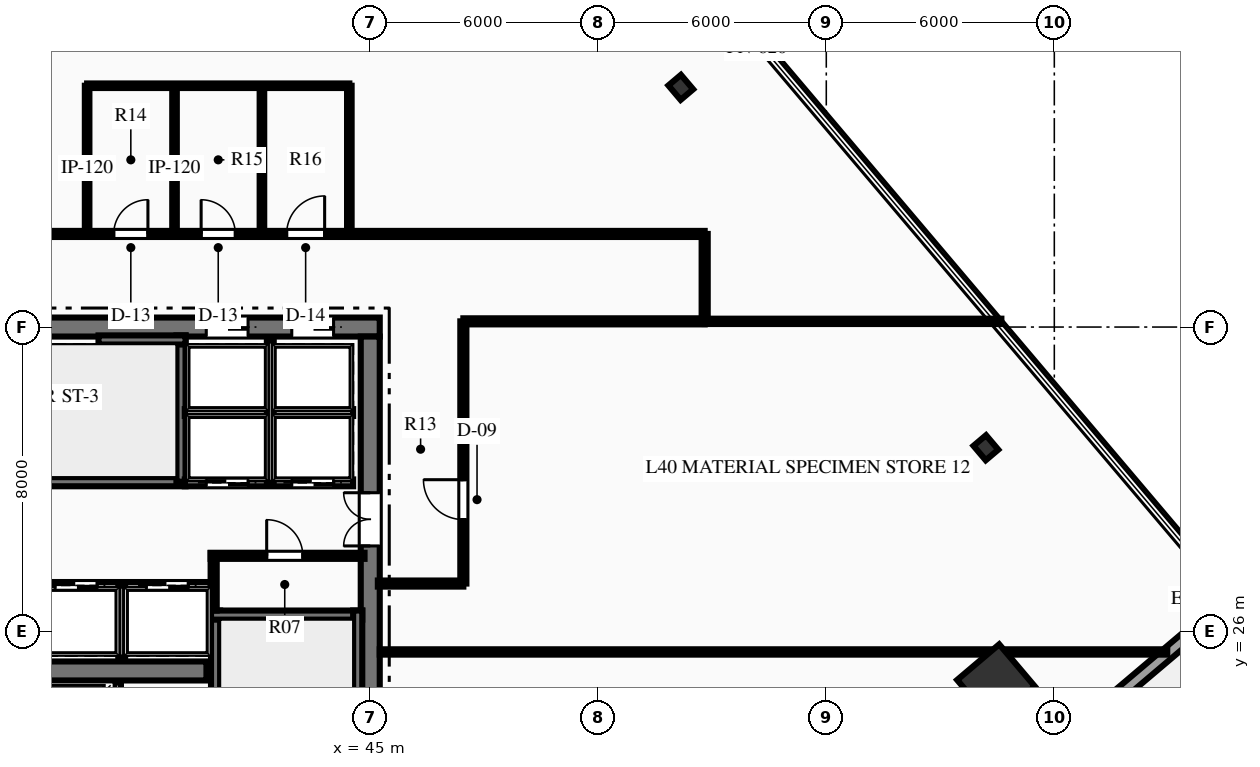
"""IFC4 building model, lengths in metres.
Left out: names, types, materials, properties, quantities, classifications, styles, units other than length and angle.
Written with IfcOpenShell. Run it as: python <this file> out.ifc"""

import sys

from ifc_helpers import new_model, si_unit, direction, frame, frame_2d, origin, origin_2d, place, context, subcontext, project, spatial, rectangle, hollow_rectangle, i_section, extrude, element, fill, save


model = new_model("IFC4")
c1 = context("Model", 3, precision=1e-05, world=origin(), true_north=direction((0.0, 1.0)))
c2 = subcontext(c1, "Body", "Model", "MODEL_VIEW")
j1 = project(units=[si_unit("LENGTHUNIT", "METRE"), si_unit("PLANEANGLEUNIT", "RADIAN")], contexts=[c1])
p1 = place(None, origin())
s1 = spatial("IfcSite", under=j1, at=p1, CompositionType="ELEMENT")
p2 = place(p1, origin())
s2 = spatial("IfcBuilding", under=s1, at=p2, CompositionType="ELEMENT")
p3 = place(p2, frame((0.0, 0.0, 163.2)))
s3 = spatial("IfcBuildingStorey", under=s2, at=p3, CompositionType="ELEMENT", Elevation=163.2)
p4 = place(p3, frame((26.75, 34.0, 0.0), z_axis=(0.0, 0.0, 1.0), x_axis=(1.0, 0.0, 0.0)))
e1 = element("IfcWall", 1, at=p4, inside=s3, PredefinedType="SHEAR", context=c2, shape_type="SweptSolid", body=[
    extrude(rectangle(XDim=18.5, YDim=0.5, at=frame_2d((9.25, 0.0))), origin(), (0.0, 0.0, 1.0), 3.75),
])
p5 = place(p4, frame((13.935, 0.0, 0.0)))
e2 = element("IfcOpeningElement", 2, at=p5, cuts=e1, PredefinedType="OPENING", context=c2, shape_type="SweptSolid", body=[
    extrude(rectangle(XDim=1.1, YDim=2.15, at=frame_2d((0.55, 1.075))), frame((0.0, 0.26, 0.0), z_axis=(0.0, -1.0, 0.0), x_axis=(1.0, 0.0, 0.0)), (0.0, 0.0, 1.0), 0.52),
])
p6 = place(p4, frame((16.185, 0.0, 0.0)))
e3 = element("IfcOpeningElement", 3, at=p6, cuts=e1, PredefinedType="OPENING", context=c2, shape_type="SweptSolid", body=[
    extrude(rectangle(XDim=1.1, YDim=2.15, at=frame_2d((0.55, 1.075))), frame((0.0, 0.26, 0.0), z_axis=(0.0, -1.0, 0.0), x_axis=(1.0, 0.0, 0.0)), (0.0, 0.0, 1.0), 0.52),
])
p7 = place(p3, frame((45.0, 18.25, 0.0), z_axis=(0.0, 0.0, 1.0), x_axis=(0.0, 1.0, 0.0)))
e4 = element("IfcWall", 4, at=p7, inside=s3, PredefinedType="SHEAR", context=c2, shape_type="SweptSolid", body=[
    extrude(rectangle(XDim=15.5, YDim=0.5, at=frame_2d((7.75, 0.0))), origin(), (0.0, 0.0, 1.0), 3.75),
])
p8 = place(p7, frame((9.99, 0.0, 0.0)))
e5 = element("IfcOpeningElement", 5, at=p8, cuts=e4, PredefinedType="OPENING", context=c2, shape_type="SweptSolid", body=[
    extrude(rectangle(XDim=1.4, YDim=2.2, at=frame_2d((0.7, 1.1))), frame((0.0, 0.26, 0.0), z_axis=(0.0, -1.0, 0.0), x_axis=(1.0, 0.0, 0.0)), (0.0, 0.0, 1.0), 0.52),
])
p9 = place(p3, frame((31.31, 24.95, 0.0), z_axis=(0.0, 0.0, 1.0), x_axis=(1.0, 0.0, 0.0)))
e6 = element("IfcWall", 6, at=p9, inside=s3, PredefinedType="SHEAR", context=c2, shape_type="SweptSolid", body=[
    extrude(rectangle(XDim=9.38, YDim=0.5, at=frame_2d((4.69, 0.0))), origin(), (0.0, 0.0, 1.0), 3.75),
])
p10 = place(p3, frame((40.93, 18.28, 0.0), z_axis=(0.0, 0.0, 1.0), x_axis=(0.0, 1.0, 0.0)))
e7 = element("IfcWall", 7, at=p10, inside=s3, PredefinedType="SHEAR", context=c2, shape_type="SweptSolid", body=[
    extrude(rectangle(XDim=8.26, YDim=0.24, at=frame_2d((4.13, 0.0))), origin(), (0.0, 0.0, 1.0), 3.75),
])
p11 = place(p10, frame((0.365, 0.0, 0.0)))
e8 = element("IfcOpeningElement", 8, at=p11, cuts=e7, PredefinedType="OPENING", context=c2, shape_type="SweptSolid", body=[
    extrude(rectangle(XDim=1.05, YDim=2.15, at=frame_2d((0.525, 1.075))), frame((0.0, 0.13, 0.0), z_axis=(0.0, -1.0, 0.0), x_axis=(1.0, 0.0, 0.0)), (0.0, 0.0, 1.0), 0.26),
])
p12 = place(p3, frame((40.81, 26.42, 0.0), z_axis=(0.0, 0.0, 1.0), x_axis=(1.0, 0.0, 0.0)))
e9 = element("IfcWall", 9, at=p12, inside=s3, PredefinedType="SHEAR", context=c2, shape_type="SweptSolid", body=[
    extrude(rectangle(XDim=3.98, YDim=0.24, at=frame_2d((1.99, 0.0))), origin(), (0.0, 0.0, 1.0), 3.75),
])
p13 = place(p3, frame((44.67, 18.28, 0.0), z_axis=(0.0, 0.0, 1.0), x_axis=(0.0, 1.0, 0.0)))
e10 = element("IfcWall", 10, at=p13, inside=s3, PredefinedType="SHEAR", context=c2, shape_type="SweptSolid", body=[
    extrude(rectangle(XDim=8.26, YDim=0.24, at=frame_2d((4.13, 0.0))), origin(), (0.0, 0.0, 1.0), 3.75),
])
p14 = place(p3, frame((31.76, 29.93, 0.0), z_axis=(0.0, 0.0, 1.0), x_axis=(1.0, 0.0, 0.0)))
e11 = element("IfcWall", 11, at=p14, inside=s3, PredefinedType="SHEAR", context=c2, shape_type="SweptSolid", body=[
    extrude(rectangle(XDim=8.38, YDim=0.24, at=frame_2d((4.19, 0.0))), origin(), (0.0, 0.0, 1.0), 3.75),
])
p15 = place(p14, frame((0.565, 0.0, 0.0)))
e12 = element("IfcOpeningElement", 12, at=p15, cuts=e11, PredefinedType="OPENING", context=c2, shape_type="SweptSolid", body=[
    extrude(rectangle(XDim=1.05, YDim=2.15, at=frame_2d((0.525, 1.075))), frame((0.0, 0.13, 0.0), z_axis=(0.0, -1.0, 0.0), x_axis=(1.0, 0.0, 0.0)), (0.0, 0.0, 1.0), 0.26),
])
p16 = place(p3, frame((40.02, 29.93, 0.0), z_axis=(0.0, 0.0, 1.0), x_axis=(0.0, 1.0, 0.0)))
e13 = element("IfcWall", 13, at=p16, inside=s3, PredefinedType="SHEAR", context=c2, shape_type="SweptSolid", body=[
    extrude(rectangle(XDim=3.85, YDim=0.24, at=frame_2d((1.925, 0.0))), origin(), (0.0, 0.0, 1.0), 3.75),
])
p17 = place(p3, frame((37.85, 33.66, 0.0), z_axis=(0.0, 0.0, 1.0), x_axis=(1.0, 0.0, 0.0)))
e14 = element("IfcWall", 14, at=p17, inside=s3, PredefinedType="SHEAR", context=c2, shape_type="SweptSolid", body=[
    extrude(rectangle(XDim=2.29, YDim=0.24, at=frame_2d((1.145, 0.0))), origin(), (0.0, 0.0, 1.0), 3.75),
])
p18 = place(p3, frame((61.465, 24.629, 0.0), z_axis=(0.0, 0.0, 1.0), x_axis=(0.763232469783, 0.646123979643, 0.0)))
e15 = element("IfcColumn", 15, at=p18, inside=s3, PredefinedType="COLUMN", context=c2, shape_type="SweptSolid", body=[
    extrude(hollow_rectangle(XDim=1.45, YDim=1.45, WallThickness=0.07, at=origin_2d()), origin(), (0.0, 0.0, 1.0), 3.75),
])
for number, where, z_axis, x_axis in (
    (16, (61.199, 30.824, 0.0), (0.0, 0.0, 1.0), (0.763, 0.646, 0.0)),
    (17, (53.171, 40.307, 0.0), (0.0, 0.0, 1.0), (0.763, 0.646, 0.0)),
):
    element("IfcColumn", number, at=place(p3, frame(where, z_axis=z_axis, x_axis=x_axis)), inside=s3, PredefinedType="COLUMN", context=c2, shape_type="SweptSolid", body=[
        extrude(i_section(OverallWidth=0.432, OverallDepth=0.498, WebThickness=0.056, FlangeThickness=0.089, at=origin_2d()), origin(), (0.0, 0.0, 1.0), 3.75),
    ])
p19 = place(p3, frame((67.776, 26.925, 0.0), z_axis=(0.0, 0.0, 1.0), x_axis=(-0.763214932113, -0.646144695405, 0.0)))
e18 = element("IfcWall", 18, at=p19, inside=s3, PredefinedType="STANDARD", context=c2, shape_type="SweptSolid", body=[
    extrude(rectangle(XDim=4.0, YDim=0.32, at=frame_2d((2.0, 0.0))), origin(), (0.0, 0.0, 1.0), 3.46),
])
p20 = place(p3, frame((38.35, 22.05, 0.0), z_axis=(0.0, 0.0, 1.0), x_axis=(0.0, 1.0, 0.0)))
e19 = element("IfcWall", 19, at=p20, inside=s3, PredefinedType="PARTITIONING", context=c2, shape_type="SweptSolid", body=[
    extrude(rectangle(XDim=2.6, YDim=0.18, at=frame_2d((1.3, 0.0))), origin(), (0.0, 0.0, 1.0), 3.46),
])
p21 = place(p3, frame((40.8, 27.98, 0.0), z_axis=(0.0, 0.0, 1.0), x_axis=(1.0, 0.0, 0.0)))
e20 = element("IfcWall", 20, at=p21, inside=s3, PredefinedType="PARTITIONING", context=c2, shape_type="SweptSolid", body=[
    extrude(rectangle(XDim=4.05, YDim=0.16, at=frame_2d((2.025, 0.0))), origin(), (0.0, 0.0, 1.0), 3.46),
])
p22 = place(p21, frame((1.475, 0.0, 0.0)))
e21 = element("IfcOpeningElement", 21, at=p22, cuts=e20, PredefinedType="OPENING", context=c2, shape_type="SweptSolid", body=[
    extrude(rectangle(XDim=0.95, YDim=2.15, at=frame_2d((0.475, 1.075))), frame((0.0, 0.09, 0.0), z_axis=(0.0, -1.0, 0.0), x_axis=(1.0, 0.0, 0.0)), (0.0, 0.0, 1.0), 0.18),
])
p23 = place(p3, frame((40.88, 26.54, 0.0), z_axis=(0.0, 0.0, 1.0), x_axis=(0.0, 1.0, 0.0)))
e22 = element("IfcWall", 22, at=p23, inside=s3, PredefinedType="PARTITIONING", context=c2, shape_type="SweptSolid", body=[
    extrude(rectangle(XDim=1.51, YDim=0.16, at=frame_2d((0.755, 0.0))), origin(), (0.0, 0.0, 1.0), 3.46),
])
p24 = place(p3, frame((40.12, 29.9, 0.0), z_axis=(0.0, 0.0, 1.0), x_axis=(1.0, 0.0, 0.0)))
e23 = element("IfcWall", 23, at=p24, inside=s3, PredefinedType="PARTITIONING", context=c2, shape_type="SweptSolid", body=[
    extrude(rectangle(XDim=4.43, YDim=0.18, at=frame_2d((2.215, 0.0))), origin(), (0.0, 0.0, 1.0), 3.46),
])
p25 = place(p24, frame((0.565, 0.0, 0.0)))
e24 = element("IfcOpeningElement", 24, at=p25, cuts=e23, PredefinedType="OPENING", context=c2, shape_type="SweptSolid", body=[
    extrude(rectangle(XDim=1.1, YDim=2.15, at=frame_2d((0.55, 1.075))), frame((0.0, 0.1, 0.0), z_axis=(0.0, -1.0, 0.0), x_axis=(1.0, 0.0, 0.0)), (0.0, 0.0, 1.0), 0.2),
])
p26 = place(p24, frame((2.815, 0.0, 0.0)))
e25 = element("IfcOpeningElement", 25, at=p26, cuts=e23, PredefinedType="OPENING", context=c2, shape_type="SweptSolid", body=[
    extrude(rectangle(XDim=1.1, YDim=2.15, at=frame_2d((0.55, 1.075))), frame((0.0, 0.1, 0.0), z_axis=(0.0, -1.0, 0.0), x_axis=(1.0, 0.0, 0.0)), (0.0, 0.0, 1.0), 0.2),
])
p27 = place(p3, frame((40.12, 31.75, 0.0), z_axis=(0.0, 0.0, 1.0), x_axis=(1.0, 0.0, 0.0)))
e26 = element("IfcWall", 26, at=p27, inside=s3, PredefinedType="PARTITIONING", context=c2, shape_type="SweptSolid", body=[
    extrude(rectangle(XDim=4.43, YDim=0.18, at=frame_2d((2.215, 0.0))), origin(), (0.0, 0.0, 1.0), 3.46),
])
p28 = place(p3, frame((42.37, 29.9, 0.0), z_axis=(0.0, 0.0, 1.0), x_axis=(0.0, 1.0, 0.0)))
e27 = element("IfcWall", 27, at=p28, inside=s3, PredefinedType="PARTITIONING", context=c2, shape_type="SweptSolid", body=[
    extrude(rectangle(XDim=3.75, YDim=0.18, at=frame_2d((1.875, 0.0))), origin(), (0.0, 0.0, 1.0), 3.46),
])
p29 = place(p3, frame((31.2, 27.2, 0.0), z_axis=(0.0, 0.0, 1.0), x_axis=(1.0, 0.0, 0.0)))
e28 = element("IfcWall", 28, at=p29, inside=s3, PredefinedType="PARTITIONING", context=c2, shape_type="SweptSolid", body=[
    extrude(rectangle(XDim=9.6, YDim=0.18, at=frame_2d((4.8, 0.0))), origin(), (0.0, 0.0, 1.0), 3.46),
])
p30 = place(p29, frame((0.59, 0.0, 0.0)))
e29 = element("IfcOpeningElement", 29, at=p30, cuts=e28, PredefinedType="OPENING", context=c2, shape_type="SweptSolid", body=[
    extrude(rectangle(XDim=1.1, YDim=2.15, at=frame_2d((0.55, 1.075))), frame((0.0, 0.1, 0.0), z_axis=(0.0, -1.0, 0.0), x_axis=(1.0, 0.0, 0.0)), (0.0, 0.0, 1.0), 0.2),
])
p31 = place(p29, frame((2.99, 0.0, 0.0)))
e30 = element("IfcOpeningElement", 30, at=p31, cuts=e28, PredefinedType="OPENING", context=c2, shape_type="SweptSolid", body=[
    extrude(rectangle(XDim=1.1, YDim=2.15, at=frame_2d((0.55, 1.075))), frame((0.0, 0.1, 0.0), z_axis=(0.0, -1.0, 0.0), x_axis=(1.0, 0.0, 0.0)), (0.0, 0.0, 1.0), 0.2),
])
p32 = place(p29, frame((5.51, 0.0, 0.0)))
e31 = element("IfcOpeningElement", 31, at=p32, cuts=e28, PredefinedType="OPENING", context=c2, shape_type="SweptSolid", body=[
    extrude(rectangle(XDim=1.1, YDim=2.15, at=frame_2d((0.55, 1.075))), frame((0.0, 0.1, 0.0), z_axis=(0.0, -1.0, 0.0), x_axis=(1.0, 0.0, 0.0)), (0.0, 0.0, 1.0), 0.2),
])
p33 = place(p29, frame((7.91, 0.0, 0.0)))
e32 = element("IfcOpeningElement", 32, at=p33, cuts=e28, PredefinedType="OPENING", context=c2, shape_type="SweptSolid", body=[
    extrude(rectangle(XDim=1.1, YDim=2.15, at=frame_2d((0.55, 1.075))), frame((0.0, 0.1, 0.0), z_axis=(0.0, -1.0, 0.0), x_axis=(1.0, 0.0, 0.0)), (0.0, 0.0, 1.0), 0.2),
])
p34 = place(p3, frame((38.46, 25.3, 0.0), z_axis=(0.0, 0.0, 1.0), x_axis=(0.0, 1.0, 0.0)))
e33 = element("IfcWall", 33, at=p34, inside=s3, PredefinedType="PARTITIONING", context=c2, shape_type="SweptSolid", body=[
    extrude(rectangle(XDim=1.9, YDim=0.18, at=frame_2d((0.95, 0.0))), origin(), (0.0, 0.0, 1.0), 3.46),
])
p35 = place(p3, frame((18.2, 36.45, 0.0), z_axis=(0.0, 0.0, 1.0), x_axis=(1.0, 0.0, 0.0)))
e34 = element("IfcWall", 34, at=p35, inside=s3, PredefinedType="PARTITIONING", context=c2, shape_type="SweptSolid", body=[
    extrude(rectangle(XDim=35.6, YDim=0.16, at=frame_2d((17.8, 0.0))), origin(), (0.0, 0.0, 1.0), 3.46),
])
p36 = place(p35, frame((20.05, 0.0, 0.0)))
e35 = element("IfcOpeningElement", 35, at=p36, cuts=e34, PredefinedType="OPENING", context=c2, shape_type="SweptSolid", body=[
    extrude(rectangle(XDim=0.9, YDim=2.15, at=frame_2d((0.45, 1.075))), frame((0.0, 0.09, 0.0), z_axis=(0.0, -1.0, 0.0), x_axis=(1.0, 0.0, 0.0)), (0.0, 0.0, 1.0), 0.18),
])
p37 = place(p35, frame((22.35, 0.0, 0.0)))
e36 = element("IfcOpeningElement", 36, at=p37, cuts=e34, PredefinedType="OPENING", context=c2, shape_type="SweptSolid", body=[
    extrude(rectangle(XDim=0.9, YDim=2.15, at=frame_2d((0.45, 1.075))), frame((0.0, 0.09, 0.0), z_axis=(0.0, -1.0, 0.0), x_axis=(1.0, 0.0, 0.0)), (0.0, 0.0, 1.0), 0.18),
])
p38 = place(p35, frame((24.6, 0.0, 0.0)))
e37 = element("IfcOpeningElement", 37, at=p38, cuts=e34, PredefinedType="OPENING", context=c2, shape_type="SweptSolid", body=[
    extrude(rectangle(XDim=1.0, YDim=2.15, at=frame_2d((0.5, 1.075))), frame((0.0, 0.09, 0.0), z_axis=(0.0, -1.0, 0.0), x_axis=(1.0, 0.0, 0.0)), (0.0, 0.0, 1.0), 0.18),
])
p39 = place(p35, frame((5.345, 0.0, 0.0)))
e38 = element("IfcOpeningElement", 38, at=p39, cuts=e34, PredefinedType="OPENING", context=c2, shape_type="SweptSolid", body=[
    extrude(rectangle(XDim=1.05, YDim=2.15, at=frame_2d((0.525, 1.075))), frame((0.0, 0.09, 0.0), z_axis=(0.0, -1.0, 0.0), x_axis=(1.0, 0.0, 0.0)), (0.0, 0.0, 1.0), 0.18),
])
p40 = place(p35, frame((15.395, 0.0, 0.0)))
e39 = element("IfcOpeningElement", 39, at=p40, cuts=e34, PredefinedType="OPENING", context=c2, shape_type="SweptSolid", body=[
    extrude(rectangle(XDim=1.05, YDim=2.15, at=frame_2d((0.525, 1.075))), frame((0.0, 0.09, 0.0), z_axis=(0.0, -1.0, 0.0), x_axis=(1.0, 0.0, 0.0)), (0.0, 0.0, 1.0), 0.18),
])
p41 = place(p3, frame((47.45, 34.15, 0.0), z_axis=(0.0, 0.0, 1.0), x_axis=(1.0, 0.0, 0.0)))
e40 = element("IfcWall", 40, at=p41, inside=s3, PredefinedType="PARTITIONING", context=c2, shape_type="SweptSolid", body=[
    extrude(rectangle(XDim=6.35, YDim=0.16, at=frame_2d((3.175, 0.0))), origin(), (0.0, 0.0, 1.0), 3.46),
])
p42 = place(p3, frame((47.45, 27.25, 0.0), z_axis=(0.0, 0.0, 1.0), x_axis=(0.0, 1.0, 0.0)))
e41 = element("IfcWall", 41, at=p42, inside=s3, PredefinedType="PARTITIONING", context=c2, shape_type="SweptSolid", body=[
    extrude(rectangle(XDim=6.9, YDim=0.16, at=frame_2d((3.45, 0.0))), origin(), (0.0, 0.0, 1.0), 3.46),
])
p43 = place(p42, frame((1.683, 0.0, 0.0)))
e42 = element("IfcOpeningElement", 42, at=p43, cuts=e41, PredefinedType="OPENING", context=c2, shape_type="SweptSolid", body=[
    extrude(rectangle(XDim=1.05, YDim=2.15, at=frame_2d((0.525, 1.075))), frame((0.0, 0.09, 0.0), z_axis=(0.0, -1.0, 0.0), x_axis=(1.0, 0.0, 0.0)), (0.0, 0.0, 1.0), 0.18),
])
p44 = place(p3, frame((45.2, 27.25, 0.0), z_axis=(0.0, 0.0, 1.0), x_axis=(1.0, 0.0, 0.0)))
e43 = element("IfcWall", 43, at=p44, inside=s3, PredefinedType="PARTITIONING", context=c2, shape_type="SweptSolid", body=[
    extrude(rectangle(XDim=2.25, YDim=0.16, at=frame_2d((1.125, 0.0))), origin(), (0.0, 0.0, 1.0), 3.46),
])
p45 = place(p3, frame((53.8, 34.15, 0.0), z_axis=(0.0, 0.0, 1.0), x_axis=(0.0, 1.0, 0.0)))
e44 = element("IfcWall", 44, at=p45, inside=s3, PredefinedType="PARTITIONING", context=c2, shape_type="SweptSolid", body=[
    extrude(rectangle(XDim=2.3, YDim=0.16, at=frame_2d((1.15, 0.0))), origin(), (0.0, 0.0, 1.0), 3.46),
])
for number, where, z_axis, x_axis in (
    (45, (37.55, 36.45, 0.0), (0.0, 0.0, 1.0), (0.0, 1.0, 0.0)),
    (46, (39.85, 36.45, 0.0), (0.0, 0.0, 1.0), (0.0, 1.0, 0.0)),
    (47, (42.15, 36.45, 0.0), (0.0, 0.0, 1.0), (0.0, 1.0, 0.0)),
    (48, (44.45, 36.45, 0.0), (0.0, 0.0, 1.0), (0.0, 1.0, 0.0)),
):
    element("IfcWall", number, at=place(p3, frame(where, z_axis=z_axis, x_axis=x_axis)), inside=s3, PredefinedType="PARTITIONING", context=c2, shape_type="SweptSolid", body=[
        extrude(rectangle(XDim=3.9, YDim=0.12, at=frame_2d((1.95, 0.0))), origin(), (0.0, 0.0, 1.0), 3.46),
    ])
p46 = place(p3, frame((37.55, 40.35, 0.0), z_axis=(0.0, 0.0, 1.0), x_axis=(1.0, 0.0, 0.0)))
e49 = element("IfcWall", 49, at=p46, inside=s3, PredefinedType="PARTITIONING", context=c2, shape_type="SweptSolid", body=[
    extrude(rectangle(XDim=6.9, YDim=0.12, at=frame_2d((3.45, 0.0))), origin(), (0.0, 0.0, 1.0), 3.46),
])
p47 = place(p3, frame((53.8, 34.15, 0.0), z_axis=(0.0, 0.0, 1.0), x_axis=(1.0, 0.0, 0.0)))
e50 = element("IfcWall", 50, at=p47, inside=s3, PredefinedType="PARTITIONING", context=c2, shape_type="SweptSolid", body=[
    extrude(rectangle(XDim=7.807, YDim=0.14, at=frame_2d((3.903, 0.0))), origin(), (0.0, 0.0, 1.0), 3.46),
])
p48 = place(p3, frame((45.25, 25.45, 0.0), z_axis=(0.0, 0.0, 1.0), x_axis=(1.0, 0.0, 0.0)))
e51 = element("IfcWall", 51, at=p48, inside=s3, PredefinedType="PARTITIONING", context=c2, shape_type="SweptSolid", body=[
    extrude(rectangle(XDim=20.721, YDim=0.14, at=frame_2d((10.361, 0.0))), origin(), (0.0, 0.0, 1.0), 3.46),
])
p49 = place(p22, origin())
e52 = element("IfcDoor", 52, at=p49, inside=s3, OperationType="SINGLE_SWING_LEFT", PredefinedType="DOOR", context=c2, shape_type="SweptSolid", body=[
    extrude(rectangle(XDim=0.95, YDim=2.15, at=frame_2d((0.475, 1.075))), frame((0.0, 0.025, 0.0), z_axis=(0.0, -1.0, 0.0), x_axis=(1.0, 0.0, 0.0)), (0.0, 0.0, 1.0), 0.05),
])
fill(e21, e52)
p50 = place(p8, origin())
e53 = element("IfcDoor", 53, at=p50, inside=s3, OperationType="DOUBLE_DOOR_SINGLE_SWING", PredefinedType="DOOR", context=c2, shape_type="SweptSolid", body=[
    extrude(rectangle(XDim=1.4, YDim=2.2, at=frame_2d((0.7, 1.1))), frame((0.0, 0.025, 0.0), z_axis=(0.0, -1.0, 0.0), x_axis=(1.0, 0.0, 0.0)), (0.0, 0.0, 1.0), 0.05),
])
fill(e5, e53)
p51 = place(p36, origin())
e54 = element("IfcDoor", 54, at=p51, inside=s3, OperationType="SINGLE_SWING_RIGHT", PredefinedType="DOOR", context=c2, shape_type="SweptSolid", body=[
    extrude(rectangle(XDim=0.9, YDim=2.15, at=frame_2d((0.45, 1.075))), frame((0.0, 0.025, 0.0), z_axis=(0.0, -1.0, 0.0), x_axis=(1.0, 0.0, 0.0)), (0.0, 0.0, 1.0), 0.05),
])
fill(e35, e54)
p52 = place(p37, origin())
e55 = element("IfcDoor", 55, at=p52, inside=s3, OperationType="SINGLE_SWING_LEFT", PredefinedType="DOOR", context=c2, shape_type="SweptSolid", body=[
    extrude(rectangle(XDim=0.9, YDim=2.15, at=frame_2d((0.45, 1.075))), frame((0.0, 0.025, 0.0), z_axis=(0.0, -1.0, 0.0), x_axis=(1.0, 0.0, 0.0)), (0.0, 0.0, 1.0), 0.05),
])
fill(e36, e55)
p53 = place(p38, origin())
e56 = element("IfcDoor", 56, at=p53, inside=s3, OperationType="SINGLE_SWING_RIGHT", PredefinedType="DOOR", context=c2, shape_type="SweptSolid", body=[
    extrude(rectangle(XDim=1.0, YDim=2.15, at=frame_2d((0.5, 1.075))), frame((0.0, 0.025, 0.0), z_axis=(0.0, -1.0, 0.0), x_axis=(1.0, 0.0, 0.0)), (0.0, 0.0, 1.0), 0.05),
])
fill(e37, e56)
p54 = place(p43, origin())
e57 = element("IfcDoor", 57, at=p54, inside=s3, OperationType="SINGLE_SWING_RIGHT", PredefinedType="DOOR", context=c2, shape_type="SweptSolid", body=[
    extrude(rectangle(XDim=1.05, YDim=2.15, at=frame_2d((0.525, 1.075))), frame((0.0, 0.025, 0.0), z_axis=(0.0, -1.0, 0.0), x_axis=(1.0, 0.0, 0.0)), (0.0, 0.0, 1.0), 0.05),
])
fill(e42, e57)
p55 = place(p25, origin())
e58 = element("IfcDoor", 58, at=p55, inside=s3, OperationType="SLIDING_TO_LEFT", PredefinedType="DOOR", context=c2, shape_type="SweptSolid", body=[
    extrude(rectangle(XDim=1.1, YDim=2.15, at=frame_2d((0.55, 1.075))), frame((0.0, 0.025, 0.0), z_axis=(0.0, -1.0, 0.0), x_axis=(1.0, 0.0, 0.0)), (0.0, 0.0, 1.0), 0.05),
])
fill(e24, e58)
p56 = place(p26, origin())
e59 = element("IfcDoor", 59, at=p56, inside=s3, OperationType="SLIDING_TO_LEFT", PredefinedType="DOOR", context=c2, shape_type="SweptSolid", body=[
    extrude(rectangle(XDim=1.1, YDim=2.15, at=frame_2d((0.55, 1.075))), frame((0.0, 0.025, 0.0), z_axis=(0.0, -1.0, 0.0), x_axis=(1.0, 0.0, 0.0)), (0.0, 0.0, 1.0), 0.05),
])
fill(e25, e59)
p57 = place(p5, origin())
e60 = element("IfcDoor", 60, at=p57, inside=s3, OperationType="SLIDING_TO_LEFT", PredefinedType="DOOR", context=c2, shape_type="SweptSolid", body=[
    extrude(rectangle(XDim=1.1, YDim=2.15, at=frame_2d((0.55, 1.075))), frame((0.0, 0.025, 0.0), z_axis=(0.0, -1.0, 0.0), x_axis=(1.0, 0.0, 0.0)), (0.0, 0.0, 1.0), 0.05),
])
fill(e2, e60)
p58 = place(p6, origin())
e61 = element("IfcDoor", 61, at=p58, inside=s3, OperationType="SLIDING_TO_LEFT", PredefinedType="DOOR", context=c2, shape_type="SweptSolid", body=[
    extrude(rectangle(XDim=1.1, YDim=2.15, at=frame_2d((0.55, 1.075))), frame((0.0, 0.025, 0.0), z_axis=(0.0, -1.0, 0.0), x_axis=(1.0, 0.0, 0.0)), (0.0, 0.0, 1.0), 0.05),
])
fill(e3, e61)
p59 = place(p32, origin())
e62 = element("IfcDoor", 62, at=p59, inside=s3, OperationType="SLIDING_TO_LEFT", PredefinedType="DOOR", context=c2, shape_type="SweptSolid", body=[
    extrude(rectangle(XDim=1.1, YDim=2.15, at=frame_2d((0.55, 1.075))), frame((0.0, 0.025, 0.0), z_axis=(0.0, -1.0, 0.0), x_axis=(1.0, 0.0, 0.0)), (0.0, 0.0, 1.0), 0.05),
])
fill(e31, e62)
p60 = place(p33, origin())
e63 = element("IfcDoor", 63, at=p60, inside=s3, OperationType="SLIDING_TO_LEFT", PredefinedType="DOOR", context=c2, shape_type="SweptSolid", body=[
    extrude(rectangle(XDim=1.1, YDim=2.15, at=frame_2d((0.55, 1.075))), frame((0.0, 0.025, 0.0), z_axis=(0.0, -1.0, 0.0), x_axis=(1.0, 0.0, 0.0)), (0.0, 0.0, 1.0), 0.05),
])
fill(e32, e63)
save(model, sys.argv[1])
